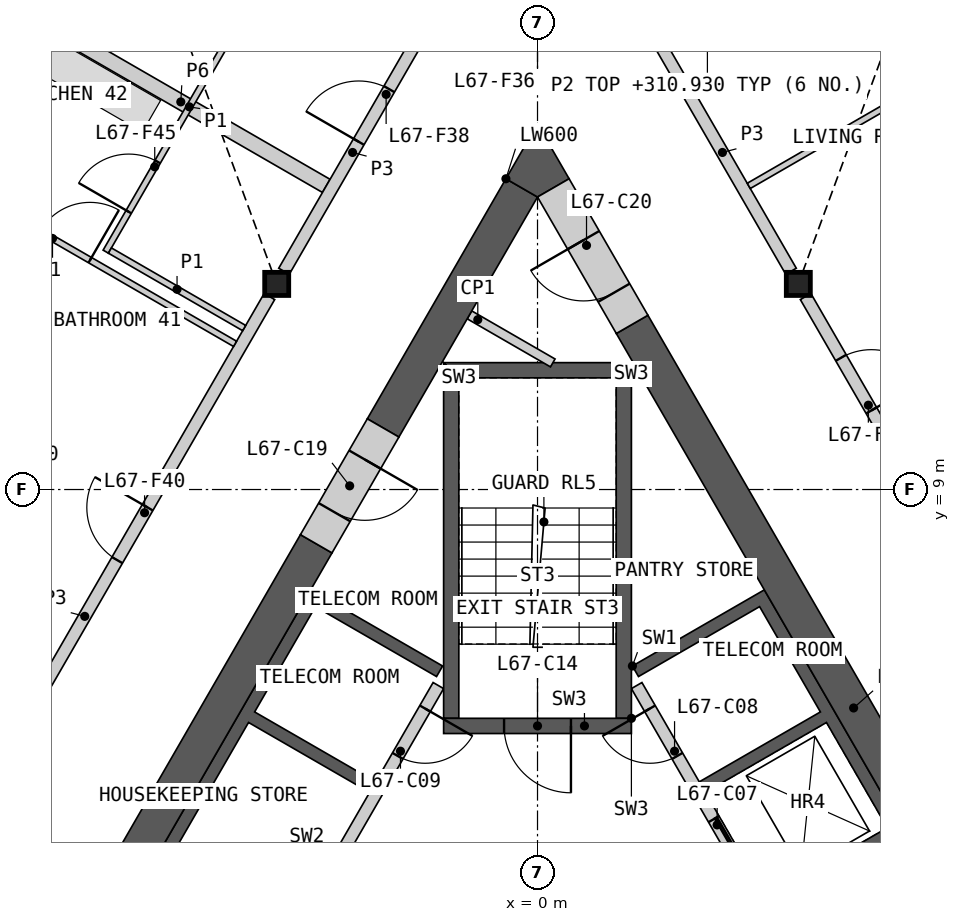
"""IFC4 building model, lengths in metres.
Left out: names, types, materials, properties, quantities, classifications, styles, units other than length and angle.
Written with IfcOpenShell. Run it as: python <this file> out.ifc"""

import sys

from ifc_helpers import new_model, si_unit, direction, frame, frame_2d, origin, origin_2d, place, context, subcontext, project, spatial, polyline, rectangle, i_section, outline, extrude, element, fill, save


model = new_model("IFC4")
c1 = context("Model", 3, precision=1e-05, world=origin(), true_north=direction((0.0, 1.0)))
c2 = subcontext(c1, "Body", "Model", "MODEL_VIEW")
j1 = project(units=[si_unit("LENGTHUNIT", "METRE"), si_unit("PLANEANGLEUNIT", "RADIAN")], contexts=[c1])
p1 = place(None, origin())
s1 = spatial("IfcSite", under=j1, at=p1, CompositionType="ELEMENT")
p2 = place(p1, origin())
s2 = spatial("IfcBuilding", under=s1, at=p2, CompositionType="ELEMENT")
p3 = place(p2, frame((0.0, 0.0, 308.6)))
s3 = spatial("IfcBuildingStorey", under=s2, at=p3, CompositionType="ELEMENT", Elevation=308.6)
for number, where, z_axis, x_axis in (
    (1, (-4.289, 12.382, 0.0), (0.0, 0.0, 1.0), (1.0, 0.0, 0.0)),
    (2, (4.289, 12.382, 0.0), (0.0, 0.0, 1.0), (1.0, 0.0, 0.0)),
):
    element("IfcColumn", number, at=place(p3, frame(where, z_axis=z_axis, x_axis=x_axis)), inside=s3, PredefinedType="COLUMN", context=c2, shape_type="SweptSolid", body=[
        extrude(i_section(OverallWidth=0.396, OverallDepth=0.381, WebThickness=0.019, FlangeThickness=0.03, at=origin_2d()), origin(), (0.0, 0.0, 1.0), 3.4),
    ])
p4 = place(p3, origin())
e3 = element("IfcWall", 3, at=p4, inside=s3, PredefinedType="SHEAR", context=c2, shape_type="SweptSolid", body=[
    extrude(outline(polyline([(1.561, 6.097), (3.731, 7.35), (8.231, -0.444), (6.061, -1.697), (5.96, -1.524), (7.952, -0.374), (6.952, 1.358), (4.96, 0.208), (4.861, 0.381), (6.852, 1.531), (5.852, 3.263), (3.861, 2.113), (3.76, 2.287), (5.752, 3.437), (4.752, 5.169), (2.76, 4.019), (2.66, 4.192), (4.652, 5.342), (3.652, 7.074), (1.66, 5.924), (1.561, 6.097)])), origin(), (0.0, 0.0, 1.0), 3.1),
])
p5 = place(p3, frame((5.817, -1.476, 0.0), z_axis=(0.0, 0.0, 1.0), x_axis=(-0.500002616675, 0.866023893041, 0.0)))
e4 = element("IfcWall", 4, at=p5, inside=s3, PredefinedType="SOLIDWALL", context=c2, shape_type="SweptSolid", body=[
    extrude(rectangle(XDim=8.373, YDim=0.2, at=frame_2d((4.187, 0.0))), origin(), (0.0, 0.0, 1.0), 3.1),
])
p6 = place(p5, frame((0.337, 0.0, 0.0)))
e5 = element("IfcOpeningElement", 5, at=p6, cuts=e4, PredefinedType="OPENING", context=c2, shape_type="SweptSolid", body=[
    extrude(rectangle(XDim=1.1, YDim=2.1, at=frame_2d((0.55, 1.05))), frame((0.0, 0.11, 0.0), z_axis=(0.0, -1.0, 0.0), x_axis=(1.0, 0.0, 0.0)), (0.0, 0.0, 1.0), 0.22),
])
p7 = place(p5, frame((2.537, 0.0, 0.0)))
e6 = element("IfcOpeningElement", 6, at=p7, cuts=e4, PredefinedType="OPENING", context=c2, shape_type="SweptSolid", body=[
    extrude(rectangle(XDim=1.1, YDim=2.1, at=frame_2d((0.55, 1.05))), frame((0.0, 0.11, 0.0), z_axis=(0.0, -1.0, 0.0), x_axis=(1.0, 0.0, 0.0)), (0.0, 0.0, 1.0), 0.22),
])
p8 = place(p5, frame((4.737, 0.0, 0.0)))
e7 = element("IfcOpeningElement", 7, at=p8, cuts=e4, PredefinedType="OPENING", context=c2, shape_type="SweptSolid", body=[
    extrude(rectangle(XDim=1.1, YDim=2.1, at=frame_2d((0.55, 1.05))), frame((0.0, 0.11, 0.0), z_axis=(0.0, -1.0, 0.0), x_axis=(1.0, 0.0, 0.0)), (0.0, 0.0, 1.0), 0.22),
])
p9 = place(p5, frame((7.037, 0.0, 0.0)))
e8 = element("IfcOpeningElement", 8, at=p9, cuts=e4, PredefinedType="OPENING", context=c2, shape_type="SweptSolid", body=[
    extrude(rectangle(XDim=0.9, YDim=2.1, at=frame_2d((0.45, 1.05))), frame((0.0, 0.11, 0.0), z_axis=(0.0, -1.0, 0.0), x_axis=(1.0, 0.0, 0.0)), (0.0, 0.0, 1.0), 0.22),
])
p10 = place(p3, origin())
e9 = element("IfcWall", 9, at=p10, inside=s3, PredefinedType="SHEAR", context=c2, shape_type="SweptSolid", body=[
    extrude(outline(polyline([(-4.96, 0.208), (-7.131, 1.461), (-3.731, 7.35), (-1.561, 6.097), (-1.66, 5.924), (-3.652, 7.074), (-4.652, 5.342), (-2.66, 4.192), (-2.76, 4.019), (-4.752, 5.169), (-6.852, 1.531), (-4.861, 0.381), (-4.96, 0.208)])), origin(), (0.0, 0.0, 1.0), 3.1),
])
p11 = place(p3, frame((-1.631, 5.776, 0.0), z_axis=(0.0, 0.0, 1.0), x_axis=(-0.499992876559, -0.866029516466, 0.0)))
e10 = element("IfcWall", 10, at=p11, inside=s3, PredefinedType="SOLIDWALL", context=c2, shape_type="SweptSolid", body=[
    extrude(rectangle(XDim=6.486, YDim=0.2, at=frame_2d((3.243, 0.0))), origin(), (0.0, 0.0, 1.0), 3.1),
])
p12 = place(p11, frame((0.437, 0.0, 0.0)))
e11 = element("IfcOpeningElement", 11, at=p12, cuts=e10, PredefinedType="OPENING", context=c2, shape_type="SweptSolid", body=[
    extrude(rectangle(XDim=0.9, YDim=2.1, at=frame_2d((0.45, 1.05))), frame((0.0, 0.11, 0.0), z_axis=(0.0, -1.0, 0.0), x_axis=(1.0, 0.0, 0.0)), (0.0, 0.0, 1.0), 0.22),
])
p13 = place(p11, frame((3.737, 0.0, 0.0)))
e12 = element("IfcOpeningElement", 12, at=p13, cuts=e10, PredefinedType="OPENING", context=c2, shape_type="SweptSolid", body=[
    extrude(rectangle(XDim=0.9, YDim=2.1, at=frame_2d((0.45, 1.05))), frame((0.0, 0.11, 0.0), z_axis=(0.0, -1.0, 0.0), x_axis=(1.0, 0.0, 0.0)), (0.0, 0.0, 1.0), 0.22),
])
p14 = place(p3, origin())
e13 = element("IfcWall", 13, at=p14, inside=s3, PredefinedType="SHEAR", context=c2, shape_type="SweptSolid", body=[
    extrude(outline(polyline([(1.544, 5.237), (1.544, 11.087), (1.294, 10.837), (1.294, 5.237), (1.544, 5.237)])), origin(), (0.0, 0.0, 1.0), 3.1),
])
p15 = place(p3, origin())
e14 = element("IfcWall", 14, at=p15, inside=s3, PredefinedType="SHEAR", context=c2, shape_type="SweptSolid", body=[
    extrude(outline(polyline([(1.544, 11.087), (-1.544, 11.087), (-1.294, 10.837), (1.294, 10.837), (1.544, 11.087)])), origin(), (0.0, 0.0, 1.0), 3.1),
])
p16 = place(p3, origin())
e15 = element("IfcWall", 15, at=p16, inside=s3, PredefinedType="SHEAR", context=c2, shape_type="SweptSolid", body=[
    extrude(outline(polyline([(-1.294, 10.837), (-1.544, 11.087), (-1.544, 5.237), (-1.294, 5.237), (-1.294, 10.837)])), origin(), (0.0, 0.0, 1.0), 3.1),
])
p17 = place(p3, frame((1.544, 5.112, 0.0), z_axis=(0.0, 0.0, 1.0), x_axis=(-1.0, 0.0, 0.0)))
e16 = element("IfcWall", 16, at=p17, inside=s3, PredefinedType="SHEAR", context=c2, shape_type="SweptSolid", body=[
    extrude(rectangle(XDim=3.088, YDim=0.25, at=frame_2d((1.544, 0.0))), origin(), (0.0, 0.0, 1.0), 3.1),
])
p18 = place(p17, frame((0.994, 0.0, 0.0)))
e17 = element("IfcOpeningElement", 17, at=p18, cuts=e16, PredefinedType="OPENING", context=c2, shape_type="SweptSolid", body=[
    extrude(rectangle(XDim=1.1, YDim=2.1, at=frame_2d((0.55, 1.05))), frame((0.0, 0.135, 0.0), z_axis=(0.0, -1.0, 0.0), x_axis=(1.0, 0.0, 0.0)), (0.0, 0.0, 1.0), 0.27),
])
p19 = place(p3, frame((-1.119, 11.873, 0.0), z_axis=(0.0, 0.0, 1.0), x_axis=(0.865992812752, -0.500056445075, 0.0)))
e18 = element("IfcWall", 18, at=p19, inside=s3, PredefinedType="PARTITIONING", context=c2, shape_type="SweptSolid", body=[
    extrude(rectangle(XDim=1.582, YDim=0.15, at=frame_2d((0.791, 0.0))), origin(), (0.0, 0.0, 1.0), 3.1),
])
p20 = place(p3, frame((8.841, -0.902, 0.0), z_axis=(0.0, 0.0, 1.0), x_axis=(-0.499995618375, 0.866027933502, 0.0)))
e19 = element("IfcWall", 19, at=p20, inside=s3, PredefinedType="SHEAR", context=c2, shape_type="SweptSolid", body=[
    extrude(rectangle(XDim=14.571, YDim=0.6, at=frame_2d((7.285, 0.0))), origin(), (0.0, 0.0, 1.0), 3.1),
])
p21 = place(p3, frame((-3.639, 8.107, 0.0), z_axis=(0.0, 0.0, 1.0), x_axis=(-0.49999180351, -0.866030135978, 0.0)))
e20 = element("IfcWall", 20, at=p21, inside=s3, PredefinedType="SHEAR", context=c2, shape_type="SweptSolid", body=[
    extrude(rectangle(XDim=7.401, YDim=0.6, at=frame_2d((3.701, 0.0))), origin(), (0.0, 0.0, 1.0), 3.1),
])
p22 = place(p3, frame((-0.26, 13.961, 0.0), z_axis=(0.0, 0.0, 1.0), x_axis=(-0.499980485389, -0.866036670257, 0.0)))
e21 = element("IfcWall", 21, at=p22, inside=s3, PredefinedType="SHEAR", context=c2, shape_type="SweptSolid", body=[
    extrude(rectangle(XDim=4.559, YDim=0.6, at=frame_2d((2.28, 0.0))), origin(), (0.0, 0.0, 1.0), 3.1),
])
p23 = place(p3, origin())
e22 = element("IfcWall", 22, at=p23, inside=s3, PredefinedType="SHEAR", context=c2, shape_type="SweptSolid", body=[
    extrude(outline(polyline([(-0.52, 14.111), (0.0, 15.011), (0.52, 14.111), (0.0, 13.811), (-0.52, 14.111)])), origin(), (0.0, 0.0, 1.0), 3.1),
])
p24 = place(p3, frame((-2.539, 10.013, 0.0), z_axis=(0.0, 0.0, 1.0), x_axis=(-0.50002983664, -0.866008176907, 0.0)))
e23 = element("IfcWall", 23, at=p24, inside=s3, PredefinedType="SHEAR", context=c2, shape_type="SweptSolid", body=[
    extrude(rectangle(XDim=2.2, YDim=0.6, at=frame_2d((1.1, 0.0))), origin(), (0.0, 0.0, 1.0), 3.1),
])
p25 = place(p24, frame((0.6, 0.0, 0.0)))
e24 = element("IfcOpeningElement", 24, at=p25, cuts=e23, PredefinedType="OPENING", context=c2, shape_type="SweptSolid", body=[
    extrude(rectangle(XDim=1.0, YDim=2.1, at=frame_2d((0.5, 1.05))), frame((0.0, 0.31, 0.0), z_axis=(0.0, -1.0, 0.0), x_axis=(1.0, 0.0, 0.0)), (0.0, 0.0, 1.0), 0.62),
])
p26 = place(p3, frame((1.556, 11.716, 0.0), z_axis=(0.0, 0.0, 1.0), x_axis=(-0.500018667571, 0.866014625789, 0.0)))
e25 = element("IfcWall", 25, at=p26, inside=s3, PredefinedType="SHEAR", context=c2, shape_type="SweptSolid", body=[
    extrude(rectangle(XDim=2.592, YDim=0.6, at=frame_2d((1.296, 0.0))), origin(), (0.0, 0.0, 1.0), 3.1),
])
p27 = place(p26, frame((0.6, 0.0, 0.0)))
e26 = element("IfcOpeningElement", 26, at=p27, cuts=e25, PredefinedType="OPENING", context=c2, shape_type="SweptSolid", body=[
    extrude(rectangle(XDim=1.0, YDim=2.1, at=frame_2d((0.5, 1.05))), frame((0.0, 0.31, 0.0), z_axis=(0.0, -1.0, 0.0), x_axis=(1.0, 0.0, 0.0)), (0.0, 0.0, 1.0), 0.62),
])
p28 = place(p3, frame((4.409, 12.174, 0.0), z_axis=(0.0, 0.0, 1.0), x_axis=(0.499984266882, -0.866034487114, 0.0)))
e27 = element("IfcWall", 27, at=p28, inside=s3, PredefinedType="PARTITIONING", context=c2, shape_type="SweptSolid", body=[
    extrude(rectangle(XDim=8.099, YDim=0.2, at=frame_2d((4.049, 0.0))), origin(), (0.0, 0.0, 1.0), 3.1),
])
p29 = place(p28, frame((5.123, 0.0, 0.0)))
e28 = element("IfcOpeningElement", 28, at=p29, cuts=e27, PredefinedType="OPENING", context=c2, shape_type="SweptSolid", body=[
    extrude(rectangle(XDim=1.0, YDim=2.1, at=frame_2d((0.5, 1.05))), frame((0.0, 0.11, 0.0), z_axis=(0.0, -1.0, 0.0), x_axis=(1.0, 0.0, 0.0)), (0.0, 0.0, 1.0), 0.22),
])
p30 = place(p28, frame((1.164, 0.0, 0.0)))
e29 = element("IfcOpeningElement", 29, at=p30, cuts=e27, PredefinedType="OPENING", context=c2, shape_type="SweptSolid", body=[
    extrude(rectangle(XDim=1.0, YDim=2.1, at=frame_2d((0.5, 1.05))), frame((0.0, 0.11, 0.0), z_axis=(0.0, -1.0, 0.0), x_axis=(1.0, 0.0, 0.0)), (0.0, 0.0, 1.0), 0.22),
])
p31 = place(p3, frame((-8.458, 5.16, 0.0), z_axis=(0.0, 0.0, 1.0), x_axis=(0.499984266882, 0.866034487114, 0.0)))
e30 = element("IfcWall", 30, at=p31, inside=s3, PredefinedType="PARTITIONING", context=c2, shape_type="SweptSolid", body=[
    extrude(rectangle(XDim=8.099, YDim=0.2, at=frame_2d((4.049, 0.0))), origin(), (0.0, 0.0, 1.0), 3.1),
])
p32 = place(p31, frame((3.093, 0.0, 0.0)))
e31 = element("IfcOpeningElement", 31, at=p32, cuts=e30, PredefinedType="OPENING", context=c2, shape_type="SweptSolid", body=[
    extrude(rectangle(XDim=1.0, YDim=2.1, at=frame_2d((0.5, 1.05))), frame((0.0, 0.11, 0.0), z_axis=(0.0, -1.0, 0.0), x_axis=(1.0, 0.0, 0.0)), (0.0, 0.0, 1.0), 0.22),
])
p33 = place(p3, frame((-8.259, 16.756, 0.0), z_axis=(0.0, 0.0, 1.0), x_axis=(0.866023692682, -0.500002963705, 0.0)))
e32 = element("IfcWall", 32, at=p33, inside=s3, PredefinedType="PARTITIONING", context=c2, shape_type="SweptSolid", body=[
    extrude(rectangle(XDim=5.525, YDim=0.25, at=frame_2d((2.762, 0.0))), origin(), (0.0, 0.0, 1.0), 2.33),
])
p34 = place(p3, frame((1.913, 16.498, 0.0), z_axis=(0.0, 0.0, 1.0), x_axis=(0.499950370306, -0.866054055606, 0.0)))
e33 = element("IfcWall", 33, at=p34, inside=s3, PredefinedType="PARTITIONING", context=c2, shape_type="SweptSolid", body=[
    extrude(rectangle(XDim=4.513, YDim=0.2, at=frame_2d((2.256, 0.0))), origin(), (0.0, 0.0, 1.0), 3.1),
])
p35 = place(p3, frame((-4.169, 12.59, 0.0), z_axis=(0.0, 0.0, 1.0), x_axis=(0.499950370306, 0.866054055606, 0.0)))
e34 = element("IfcWall", 34, at=p35, inside=s3, PredefinedType="PARTITIONING", context=c2, shape_type="SweptSolid", body=[
    extrude(rectangle(XDim=4.513, YDim=0.2, at=frame_2d((2.256, 0.0))), origin(), (0.0, 0.0, 1.0), 3.1),
])
p36 = place(p35, frame((2.459, 0.0, 0.0)))
e35 = element("IfcOpeningElement", 35, at=p36, cuts=e34, PredefinedType="OPENING", context=c2, shape_type="SweptSolid", body=[
    extrude(rectangle(XDim=1.0, YDim=2.1, at=frame_2d((0.5, 1.05))), frame((0.0, 0.11, 0.0), z_axis=(0.0, -1.0, 0.0), x_axis=(1.0, 0.0, 0.0)), (0.0, 0.0, 1.0), 0.22),
])
p37 = place(p3, frame((3.474, 13.994, 0.0), z_axis=(0.0, 0.0, 1.0), x_axis=(0.866032424046, 0.499987840353, 0.0)))
e36 = element("IfcWall", 36, at=p37, inside=s3, PredefinedType="PARTITIONING", context=c2, shape_type="SweptSolid", body=[
    extrude(rectangle(XDim=12.635, YDim=0.1, at=frame_2d((6.317, 0.0))), origin(), (0.0, 0.0, 1.0), 2.33),
])
p38 = place(p37, frame((8.714, 0.0, 0.0)))
e37 = element("IfcOpeningElement", 37, at=p38, cuts=e36, PredefinedType="OPENING", context=c2, shape_type="SweptSolid", body=[
    extrude(rectangle(XDim=0.95, YDim=2.1, at=frame_2d((0.475, 1.05))), frame((0.0, 0.06, 0.0), z_axis=(0.0, -1.0, 0.0), x_axis=(1.0, 0.0, 0.0)), (0.0, 0.0, 1.0), 0.12),
])
p39 = place(p3, frame((-9.787, 14.174, 0.0), z_axis=(0.0, 0.0, 1.0), x_axis=(0.866031222068, -0.499989922303, 0.0)))
e38 = element("IfcWall", 38, at=p39, inside=s3, PredefinedType="PARTITIONING", context=c2, shape_type="SweptSolid", body=[
    extrude(rectangle(XDim=5.557, YDim=0.1, at=frame_2d((2.779, 0.0))), origin(), (0.0, 0.0, 1.0), 2.33),
])
p40 = place(p39, frame((1.853, 0.0, 0.0)))
e39 = element("IfcOpeningElement", 39, at=p40, cuts=e38, PredefinedType="OPENING", context=c2, shape_type="SweptSolid", body=[
    extrude(rectangle(XDim=0.95, YDim=2.1, at=frame_2d((0.475, 1.05))), frame((0.0, 0.06, 0.0), z_axis=(0.0, -1.0, 0.0), x_axis=(1.0, 0.0, 0.0)), (0.0, 0.0, 1.0), 0.12),
])
p41 = place(p3, frame((-7.101, 12.912, 0.0), z_axis=(0.0, 0.0, 1.0), x_axis=(0.499996545922, 0.866027397988, 0.0)))
e40 = element("IfcWall", 40, at=p41, inside=s3, PredefinedType="PARTITIONING", context=c2, shape_type="SweptSolid", body=[
    extrude(rectangle(XDim=5.5, YDim=0.1, at=frame_2d((2.75, 0.0))), origin(), (0.0, 0.0, 1.0), 2.33),
])
p42 = place(p41, frame((0.756, 0.0, 0.0)))
e41 = element("IfcOpeningElement", 41, at=p42, cuts=e40, PredefinedType="OPENING", context=c2, shape_type="SweptSolid", body=[
    extrude(rectangle(XDim=0.95, YDim=2.1, at=frame_2d((0.475, 1.05))), frame((0.0, 0.06, 0.0), z_axis=(0.0, -1.0, 0.0), x_axis=(1.0, 0.0, 0.0)), (0.0, 0.0, 1.0), 0.12),
])
p43 = place(p3, frame((-7.032, 12.93, 0.0), z_axis=(0.0, 0.0, 1.0), x_axis=(0.866030925526, -0.499990435942, 0.0)))
e42 = element("IfcWall", 42, at=p43, inside=s3, PredefinedType="PARTITIONING", context=c2, shape_type="SweptSolid", body=[
    extrude(rectangle(XDim=2.55, YDim=0.1, at=frame_2d((1.275, 0.0))), origin(), (0.0, 0.0, 1.0), 2.33),
])
p44 = place(p8, origin())
e43 = element("IfcDoor", 43, at=p44, inside=s3, OperationType="SLIDING_TO_LEFT", PredefinedType="DOOR", context=c2, shape_type="SweptSolid", body=[
    extrude(rectangle(XDim=1.1, YDim=2.1, at=frame_2d((0.55, 1.05))), frame((0.0, 0.025, 0.0), z_axis=(0.0, -1.0, 0.0), x_axis=(1.0, 0.0, 0.0)), (0.0, 0.0, 1.0), 0.05),
])
fill(e7, e43)
p45 = place(p9, origin())
e44 = element("IfcDoor", 44, at=p45, inside=s3, OperationType="SINGLE_SWING_RIGHT", PredefinedType="DOOR", context=c2, shape_type="SweptSolid", body=[
    extrude(rectangle(XDim=0.9, YDim=2.1, at=frame_2d((0.45, 1.05))), frame((0.0, 0.025, 0.0), z_axis=(0.0, -1.0, 0.0), x_axis=(1.0, 0.0, 0.0)), (0.0, 0.0, 1.0), 0.05),
])
fill(e8, e44)
p46 = place(p12, origin())
e45 = element("IfcDoor", 45, at=p46, inside=s3, OperationType="SINGLE_SWING_LEFT", PredefinedType="DOOR", context=c2, shape_type="SweptSolid", body=[
    extrude(rectangle(XDim=0.9, YDim=2.1, at=frame_2d((0.45, 1.05))), frame((0.0, 0.025, 0.0), z_axis=(0.0, -1.0, 0.0), x_axis=(1.0, 0.0, 0.0)), (0.0, 0.0, 1.0), 0.05),
])
fill(e11, e45)
p47 = place(p18, origin())
e46 = element("IfcDoor", 46, at=p47, inside=s3, OperationType="SINGLE_SWING_LEFT", PredefinedType="DOOR", context=c2, shape_type="SweptSolid", body=[
    extrude(rectangle(XDim=1.1, YDim=2.1, at=frame_2d((0.55, 1.05))), frame((0.0, 0.025, 0.0), z_axis=(0.0, -1.0, 0.0), x_axis=(1.0, 0.0, 0.0)), (0.0, 0.0, 1.0), 0.05),
])
fill(e17, e46)
p48 = place(p25, origin())
e47 = element("IfcDoor", 47, at=p48, inside=s3, OperationType="SINGLE_SWING_LEFT", PredefinedType="DOOR", context=c2, shape_type="SweptSolid", body=[
    extrude(rectangle(XDim=1.0, YDim=2.1, at=frame_2d((0.5, 1.05))), frame((0.0, 0.055, 0.0), z_axis=(0.0, -1.0, 0.0), x_axis=(1.0, 0.0, 0.0)), (0.0, 0.0, 1.0), 0.05),
])
fill(e24, e47)
p49 = place(p27, origin())
e48 = element("IfcDoor", 48, at=p49, inside=s3, OperationType="SINGLE_SWING_RIGHT", PredefinedType="DOOR", context=c2, shape_type="SweptSolid", body=[
    extrude(rectangle(XDim=1.0, YDim=2.1, at=frame_2d((0.5, 1.05))), frame((0.0, 0.055, 0.0), z_axis=(0.0, -1.0, 0.0), x_axis=(1.0, 0.0, 0.0)), (0.0, 0.0, 1.0), 0.05),
])
fill(e26, e48)
p50 = place(p30, origin())
e49 = element("IfcDoor", 49, at=p50, inside=s3, OperationType="SINGLE_SWING_RIGHT", PredefinedType="DOOR", context=c2, shape_type="SweptSolid", body=[
    extrude(rectangle(XDim=1.0, YDim=2.1, at=frame_2d((0.5, 1.05))), frame((0.0, 0.025, 0.0), z_axis=(0.0, -1.0, 0.0), x_axis=(1.0, 0.0, 0.0)), (0.0, 0.0, 1.0), 0.05),
])
fill(e29, e49)
p51 = place(p36, origin())
e50 = element("IfcDoor", 50, at=p51, inside=s3, OperationType="SINGLE_SWING_LEFT", PredefinedType="DOOR", context=c2, shape_type="SweptSolid", body=[
    extrude(rectangle(XDim=1.0, YDim=2.1, at=frame_2d((0.5, 1.05))), frame((0.0, 0.025, 0.0), z_axis=(0.0, -1.0, 0.0), x_axis=(1.0, 0.0, 0.0)), (0.0, 0.0, 1.0), 0.05),
])
fill(e35, e50)
p52 = place(p32, origin())
e51 = element("IfcDoor", 51, at=p52, inside=s3, OperationType="SINGLE_SWING_RIGHT", PredefinedType="DOOR", context=c2, shape_type="SweptSolid", body=[
    extrude(rectangle(XDim=1.0, YDim=2.1, at=frame_2d((0.5, 1.05))), frame((0.0, 0.025, 0.0), z_axis=(0.0, -1.0, 0.0), x_axis=(1.0, 0.0, 0.0)), (0.0, 0.0, 1.0), 0.05),
])
fill(e31, e51)
p53 = place(p40, origin())
e52 = element("IfcDoor", 52, at=p53, inside=s3, OperationType="SINGLE_SWING_RIGHT", PredefinedType="DOOR", context=c2, shape_type="SweptSolid", body=[
    extrude(rectangle(XDim=0.95, YDim=2.1, at=frame_2d((0.475, 1.05))), frame((0.0, 0.025, 0.0), z_axis=(0.0, -1.0, 0.0), x_axis=(1.0, 0.0, 0.0)), (0.0, 0.0, 1.0), 0.05),
])
fill(e39, e52)
p54 = place(p42, origin())
e53 = element("IfcDoor", 53, at=p54, inside=s3, OperationType="SINGLE_SWING_LEFT", PredefinedType="DOOR", context=c2, shape_type="SweptSolid", body=[
    extrude(rectangle(XDim=0.95, YDim=2.1, at=frame_2d((0.475, 1.05))), frame((0.0, 0.025, 0.0), z_axis=(0.0, -1.0, 0.0), x_axis=(1.0, 0.0, 0.0)), (0.0, 0.0, 1.0), 0.05),
])
fill(e41, e53)
save(model, sys.argv[1])
